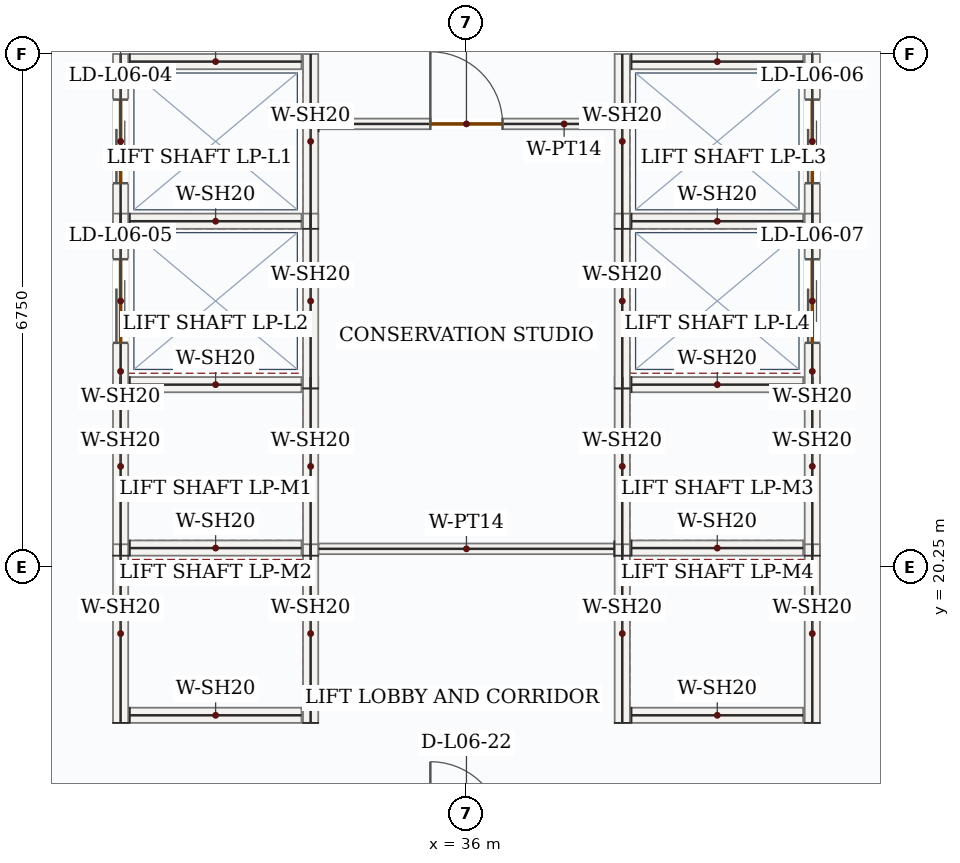
"""IFC4 building model, lengths in metres.
Left out: names, types, materials, properties, quantities, classifications, styles, units other than length and angle.
Written with IfcOpenShell. Run it as: python <this file> out.ifc"""

import sys

from ifc_helpers import new_model, si_unit, direction, frame, frame_2d, origin, place, context, subcontext, project, spatial, rectangle, extrude, source, transform, mapped, element, fill, save


model = new_model("IFC4")
c1 = context("Model", 3, precision=1e-05, world=origin(), true_north=direction((0.0, 1.0)))
c2 = subcontext(c1, "Body", "Model", "MODEL_VIEW")
j1 = project(units=[si_unit("LENGTHUNIT", "METRE"), si_unit("PLANEANGLEUNIT", "RADIAN")], contexts=[c1])
p1 = place(None, origin())
s1 = spatial("IfcSite", under=j1, at=p1, CompositionType="ELEMENT")
p2 = place(p1, origin())
s2 = spatial("IfcBuilding", under=s1, at=p2, CompositionType="ELEMENT")
p3 = place(p2, frame((0.0, 0.0, 33.3)))
s3 = spatial("IfcBuildingStorey", under=s2, at=p3, CompositionType="ELEMENT", Elevation=33.3)
m1 = source(origin(), c2, "Body", "SweptSolid", [
    extrude(rectangle(XDim=2.35, YDim=0.2, at=frame_2d((1.175, 0.0))), origin(), (0.0, 0.0, 1.0), 3.95),
])
for number, where, z_axis, x_axis in (
    (1, (31.45, 20.4, 0.0), (0.0, 0.0, 1.0), (0.0, 1.0, 0.0)),
    (2, (33.95, 20.4, 0.0), (0.0, 0.0, 1.0), (0.0, 1.0, 0.0)),
):
    element("IfcWall", number, at=place(p3, frame(where, z_axis=z_axis, x_axis=x_axis)), inside=s3, PredefinedType="SOLIDWALL", context=c2, shape_type="MappedRepresentation", body=[
        mapped(m1, transform((0.0, 0.0, 0.0), x_axis=(1.0, 0.0, 0.0), y_axis=(0.0, 1.0, 0.0), z_axis=(0.0, 0.0, 1.0), scale=1.0)),
    ])
m2 = source(origin(), c2, "Body", "SweptSolid", [
    extrude(rectangle(XDim=2.26, YDim=0.2, at=frame_2d((1.13, 0.0))), origin(), (0.0, 0.0, 1.0), 3.95),
])
for number, where, z_axis, x_axis in (
    (3, (31.57, 20.5, 0.0), (0.0, 0.0, 1.0), (1.0, 0.0, 0.0)),
    (4, (31.57, 22.65, 0.0), (0.0, 0.0, 1.0), (1.0, 0.0, 0.0)),
):
    element("IfcWall", number, at=place(p3, frame(where, z_axis=z_axis, x_axis=x_axis)), inside=s3, PredefinedType="SOLIDWALL", context=c2, shape_type="MappedRepresentation", body=[
        mapped(m2, transform((0.0, 0.0, 0.0), x_axis=(1.0, 0.0, 0.0), y_axis=(0.0, 1.0, 0.0), z_axis=(0.0, 0.0, 1.0), scale=1.0)),
    ])
for number, where, z_axis, x_axis in (
    (5, (31.45, 18.2, 0.0), (0.0, 0.0, 1.0), (0.0, 1.0, 0.0)),
    (6, (33.95, 18.2, 0.0), (0.0, 0.0, 1.0), (0.0, 1.0, 0.0)),
):
    element("IfcWall", number, at=place(p3, frame(where, z_axis=z_axis, x_axis=x_axis)), inside=s3, PredefinedType="SOLIDWALL", context=c2, shape_type="MappedRepresentation", body=[
        mapped(m1, transform((0.0, 0.0, 0.0), x_axis=(1.0, 0.0, 0.0), y_axis=(0.0, 1.0, 0.0), z_axis=(0.0, 0.0, 1.0), scale=1.0)),
    ])
p4 = place(p3, frame((31.57, 18.3, 0.0), z_axis=(0.0, 0.0, 1.0), x_axis=(1.0, 0.0, 0.0)))
e7 = element("IfcWall", 7, at=p4, inside=s3, PredefinedType="SOLIDWALL", context=c2, shape_type="MappedRepresentation", body=[
    mapped(m2, transform((0.0, 0.0, 0.0), x_axis=(1.0, 0.0, 0.0), y_axis=(0.0, 1.0, 0.0), z_axis=(0.0, 0.0, 1.0), scale=1.0)),
])
for number, where, z_axis, x_axis in (
    (8, (38.05, 20.4, 0.0), (0.0, 0.0, 1.0), (0.0, 1.0, 0.0)),
    (9, (40.55, 20.4, 0.0), (0.0, 0.0, 1.0), (0.0, 1.0, 0.0)),
):
    element("IfcWall", number, at=place(p3, frame(where, z_axis=z_axis, x_axis=x_axis)), inside=s3, PredefinedType="SOLIDWALL", context=c2, shape_type="MappedRepresentation", body=[
        mapped(m1, transform((0.0, 0.0, 0.0), x_axis=(1.0, 0.0, 0.0), y_axis=(0.0, 1.0, 0.0), z_axis=(0.0, 0.0, 1.0), scale=1.0)),
    ])
for number, where, z_axis, x_axis in (
    (10, (38.17, 20.5, 0.0), (0.0, 0.0, 1.0), (1.0, 0.0, 0.0)),
    (11, (38.17, 22.65, 0.0), (0.0, 0.0, 1.0), (1.0, 0.0, 0.0)),
):
    element("IfcWall", number, at=place(p3, frame(where, z_axis=z_axis, x_axis=x_axis)), inside=s3, PredefinedType="SOLIDWALL", context=c2, shape_type="MappedRepresentation", body=[
        mapped(m2, transform((0.0, 0.0, 0.0), x_axis=(1.0, 0.0, 0.0), y_axis=(0.0, 1.0, 0.0), z_axis=(0.0, 0.0, 1.0), scale=1.0)),
    ])
for number, where, z_axis, x_axis in (
    (12, (38.05, 18.2, 0.0), (0.0, 0.0, 1.0), (0.0, 1.0, 0.0)),
    (13, (40.55, 18.2, 0.0), (0.0, 0.0, 1.0), (0.0, 1.0, 0.0)),
):
    element("IfcWall", number, at=place(p3, frame(where, z_axis=z_axis, x_axis=x_axis)), inside=s3, PredefinedType="SOLIDWALL", context=c2, shape_type="MappedRepresentation", body=[
        mapped(m1, transform((0.0, 0.0, 0.0), x_axis=(1.0, 0.0, 0.0), y_axis=(0.0, 1.0, 0.0), z_axis=(0.0, 0.0, 1.0), scale=1.0)),
    ])
p5 = place(p3, frame((38.17, 18.3, 0.0), z_axis=(0.0, 0.0, 1.0), x_axis=(1.0, 0.0, 0.0)))
e14 = element("IfcWall", 14, at=p5, inside=s3, PredefinedType="SOLIDWALL", context=c2, shape_type="MappedRepresentation", body=[
    mapped(m2, transform((0.0, 0.0, 0.0), x_axis=(1.0, 0.0, 0.0), y_axis=(0.0, 1.0, 0.0), z_axis=(0.0, 0.0, 1.0), scale=1.0)),
])
p6 = place(p3, frame((31.45, 24.7, 0.0), z_axis=(0.0, 0.0, 1.0), x_axis=(0.0, 1.0, 0.0)))
e15 = element("IfcWall", 15, at=p6, inside=s3, PredefinedType="SOLIDWALL", context=c2, shape_type="SweptSolid", body=[
    extrude(rectangle(XDim=2.3, YDim=0.2, at=frame_2d((1.15, 0.0))), origin(), (0.0, 0.0, 1.0), 3.95),
])
p7 = place(p6, frame((0.6, 0.0, 0.0)))
e16 = element("IfcOpeningElement", 16, at=p7, cuts=e15, PredefinedType="OPENING", context=c2, shape_type="SweptSolid", body=[
    extrude(rectangle(XDim=1.1, YDim=2.15, at=frame_2d((0.55, 1.075))), frame((0.0, 0.11, 0.0), z_axis=(0.0, -1.0, 0.0), x_axis=(1.0, 0.0, 0.0)), (0.0, 0.0, 1.0), 0.22),
])
m3 = source(origin(), c2, "Body", "SweptSolid", [
    extrude(rectangle(XDim=2.3, YDim=0.2, at=frame_2d((1.15, 0.0))), origin(), (0.0, 0.0, 1.0), 3.95),
])
p8 = place(p3, frame((33.95, 24.7, 0.0), z_axis=(0.0, 0.0, 1.0), x_axis=(0.0, 1.0, 0.0)))
e17 = element("IfcWall", 17, at=p8, inside=s3, PredefinedType="SOLIDWALL", context=c2, shape_type="MappedRepresentation", body=[
    mapped(m3, transform((0.0, 0.0, 0.0), x_axis=(1.0, 0.0, 0.0), y_axis=(0.0, 1.0, 0.0), z_axis=(0.0, 0.0, 1.0), scale=1.0)),
])
for number, where, z_axis, x_axis in (
    (18, (31.57, 24.8, 0.0), (0.0, 0.0, 1.0), (1.0, 0.0, 0.0)),
    (19, (31.57, 26.9, 0.0), (0.0, 0.0, 1.0), (1.0, 0.0, 0.0)),
):
    element("IfcWall", number, at=place(p3, frame(where, z_axis=z_axis, x_axis=x_axis)), inside=s3, PredefinedType="SOLIDWALL", context=c2, shape_type="MappedRepresentation", body=[
        mapped(m2, transform((0.0, 0.0, 0.0), x_axis=(1.0, 0.0, 0.0), y_axis=(0.0, 1.0, 0.0), z_axis=(0.0, 0.0, 1.0), scale=1.0)),
    ])
p9 = place(p3, frame((31.45, 22.6, 0.0), z_axis=(0.0, 0.0, 1.0), x_axis=(0.0, 1.0, 0.0)))
e20 = element("IfcWall", 20, at=p9, inside=s3, PredefinedType="SOLIDWALL", context=c2, shape_type="SweptSolid", body=[
    extrude(rectangle(XDim=2.3, YDim=0.2, at=frame_2d((1.15, 0.0))), origin(), (0.0, 0.0, 1.0), 3.95),
])
p10 = place(p9, frame((0.6, 0.0, 0.0)))
e21 = element("IfcOpeningElement", 21, at=p10, cuts=e20, PredefinedType="OPENING", context=c2, shape_type="SweptSolid", body=[
    extrude(rectangle(XDim=1.1, YDim=2.15, at=frame_2d((0.55, 1.075))), frame((0.0, 0.11, 0.0), z_axis=(0.0, -1.0, 0.0), x_axis=(1.0, 0.0, 0.0)), (0.0, 0.0, 1.0), 0.22),
])
m4 = source(origin(), c2, "Body", "SweptSolid", [
    extrude(rectangle(XDim=2.3, YDim=0.2, at=frame_2d((1.15, 0.0))), origin(), (0.0, 0.0, 1.0), 3.95),
])
p11 = place(p3, frame((33.95, 22.6, 0.0), z_axis=(0.0, 0.0, 1.0), x_axis=(0.0, 1.0, 0.0)))
e22 = element("IfcWall", 22, at=p11, inside=s3, PredefinedType="SOLIDWALL", context=c2, shape_type="MappedRepresentation", body=[
    mapped(m4, transform((0.0, 0.0, 0.0), x_axis=(1.0, 0.0, 0.0), y_axis=(0.0, 1.0, 0.0), z_axis=(0.0, 0.0, 1.0), scale=1.0)),
])
p12 = place(p3, frame((38.05, 24.7, 0.0), z_axis=(0.0, 0.0, 1.0), x_axis=(0.0, 1.0, 0.0)))
e23 = element("IfcWall", 23, at=p12, inside=s3, PredefinedType="SOLIDWALL", context=c2, shape_type="MappedRepresentation", body=[
    mapped(m3, transform((0.0, 0.0, 0.0), x_axis=(1.0, 0.0, 0.0), y_axis=(0.0, 1.0, 0.0), z_axis=(0.0, 0.0, 1.0), scale=1.0)),
])
p13 = place(p3, frame((40.55, 24.7, 0.0), z_axis=(0.0, 0.0, 1.0), x_axis=(0.0, 1.0, 0.0)))
e24 = element("IfcWall", 24, at=p13, inside=s3, PredefinedType="SOLIDWALL", context=c2, shape_type="SweptSolid", body=[
    extrude(rectangle(XDim=2.3, YDim=0.2, at=frame_2d((1.15, 0.0))), origin(), (0.0, 0.0, 1.0), 3.95),
])
p14 = place(p13, frame((0.6, 0.0, 0.0)))
e25 = element("IfcOpeningElement", 25, at=p14, cuts=e24, PredefinedType="OPENING", context=c2, shape_type="SweptSolid", body=[
    extrude(rectangle(XDim=1.1, YDim=2.15, at=frame_2d((0.55, 1.075))), frame((0.0, 0.11, 0.0), z_axis=(0.0, -1.0, 0.0), x_axis=(1.0, 0.0, 0.0)), (0.0, 0.0, 1.0), 0.22),
])
for number, where, z_axis, x_axis in (
    (26, (38.17, 24.8, 0.0), (0.0, 0.0, 1.0), (1.0, 0.0, 0.0)),
    (27, (38.17, 26.9, 0.0), (0.0, 0.0, 1.0), (1.0, 0.0, 0.0)),
):
    element("IfcWall", number, at=place(p3, frame(where, z_axis=z_axis, x_axis=x_axis)), inside=s3, PredefinedType="SOLIDWALL", context=c2, shape_type="MappedRepresentation", body=[
        mapped(m2, transform((0.0, 0.0, 0.0), x_axis=(1.0, 0.0, 0.0), y_axis=(0.0, 1.0, 0.0), z_axis=(0.0, 0.0, 1.0), scale=1.0)),
    ])
p15 = place(p3, frame((38.05, 22.6, 0.0), z_axis=(0.0, 0.0, 1.0), x_axis=(0.0, 1.0, 0.0)))
e28 = element("IfcWall", 28, at=p15, inside=s3, PredefinedType="SOLIDWALL", context=c2, shape_type="MappedRepresentation", body=[
    mapped(m4, transform((0.0, 0.0, 0.0), x_axis=(1.0, 0.0, 0.0), y_axis=(0.0, 1.0, 0.0), z_axis=(0.0, 0.0, 1.0), scale=1.0)),
])
p16 = place(p3, frame((40.55, 22.6, 0.0), z_axis=(0.0, 0.0, 1.0), x_axis=(0.0, 1.0, 0.0)))
e29 = element("IfcWall", 29, at=p16, inside=s3, PredefinedType="SOLIDWALL", context=c2, shape_type="SweptSolid", body=[
    extrude(rectangle(XDim=2.3, YDim=0.2, at=frame_2d((1.15, 0.0))), origin(), (0.0, 0.0, 1.0), 3.95),
])
p17 = place(p16, frame((0.6, 0.0, 0.0)))
e30 = element("IfcOpeningElement", 30, at=p17, cuts=e29, PredefinedType="OPENING", context=c2, shape_type="SweptSolid", body=[
    extrude(rectangle(XDim=1.1, YDim=2.15, at=frame_2d((0.55, 1.075))), frame((0.0, 0.11, 0.0), z_axis=(0.0, -1.0, 0.0), x_axis=(1.0, 0.0, 0.0)), (0.0, 0.0, 1.0), 0.22),
])
p18 = place(p3, frame((34.055, 26.08, 0.0), z_axis=(0.0, 0.0, 1.0), x_axis=(1.0, 0.0, 0.0)))
e31 = element("IfcWall", 31, at=p18, inside=s3, PredefinedType="PARTITIONING", context=c2, shape_type="SweptSolid", body=[
    extrude(rectangle(XDim=3.89, YDim=0.14, at=frame_2d((1.945, 0.0))), origin(), (0.0, 0.0, 1.0), 3.95),
])
p19 = place(p18, frame((1.47, 0.0, 0.0)))
e32 = element("IfcOpeningElement", 32, at=p19, cuts=e31, PredefinedType="OPENING", context=c2, shape_type="SweptSolid", body=[
    extrude(rectangle(XDim=0.95, YDim=2.15, at=frame_2d((0.475, 1.075))), frame((0.0, 0.08, 0.0), z_axis=(0.0, -1.0, 0.0), x_axis=(1.0, 0.0, 0.0)), (0.0, 0.0, 1.0), 0.16),
])
m5 = source(origin(), c2, "Body", "SweptSolid", [
    extrude(rectangle(XDim=3.89, YDim=0.14, at=frame_2d((1.945, 0.0))), origin(), (0.0, 0.0, 1.0), 3.95),
])
p20 = place(p3, frame((37.945, 20.49, 0.0), z_axis=(0.0, 0.0, 1.0), x_axis=(-1.0, 0.0, 0.0)))
e33 = element("IfcWall", 33, at=p20, inside=s3, PredefinedType="PARTITIONING", context=c2, shape_type="MappedRepresentation", body=[
    mapped(m5, transform((0.0, 0.0, 0.0), x_axis=(1.0, 0.0, 0.0), y_axis=(0.0, 1.0, 0.0), z_axis=(0.0, 0.0, 1.0), scale=1.0)),
])
m6 = source(origin(), c2, "Body", "SweptSolid", [
    extrude(rectangle(XDim=1.1, YDim=2.15, at=frame_2d((0.55, 1.075))), frame((0.0, 0.025, 0.0), z_axis=(0.0, -1.0, 0.0), x_axis=(1.0, 0.0, 0.0)), (0.0, 0.0, 1.0), 0.05),
])
p21 = place(p7, origin())
e34 = element("IfcDoor", 34, at=p21, inside=s3, OperationType="DOUBLE_DOOR_SLIDING", PredefinedType="DOOR", context=c2, shape_type="MappedRepresentation", body=[
    mapped(m6, transform((0.0, 0.0, 0.0), x_axis=(1.0, 0.0, 0.0), y_axis=(0.0, 1.0, 0.0), z_axis=(0.0, 0.0, 1.0), scale=1.0)),
])
fill(e16, e34)
p22 = place(p10, origin())
e35 = element("IfcDoor", 35, at=p22, inside=s3, OperationType="DOUBLE_DOOR_SLIDING", PredefinedType="DOOR", context=c2, shape_type="MappedRepresentation", body=[
    mapped(m6, transform((0.0, 0.0, 0.0), x_axis=(1.0, 0.0, 0.0), y_axis=(0.0, 1.0, 0.0), z_axis=(0.0, 0.0, 1.0), scale=1.0)),
])
fill(e21, e35)
p23 = place(p14, origin())
e36 = element("IfcDoor", 36, at=p23, inside=s3, OperationType="DOUBLE_DOOR_SLIDING", PredefinedType="DOOR", context=c2, shape_type="MappedRepresentation", body=[
    mapped(m6, transform((0.0, 0.0, 0.0), x_axis=(1.0, 0.0, 0.0), y_axis=(0.0, 1.0, 0.0), z_axis=(0.0, 0.0, 1.0), scale=1.0)),
])
fill(e25, e36)
p24 = place(p17, origin())
e37 = element("IfcDoor", 37, at=p24, inside=s3, OperationType="DOUBLE_DOOR_SLIDING", PredefinedType="DOOR", context=c2, shape_type="MappedRepresentation", body=[
    mapped(m6, transform((0.0, 0.0, 0.0), x_axis=(1.0, 0.0, 0.0), y_axis=(0.0, 1.0, 0.0), z_axis=(0.0, 0.0, 1.0), scale=1.0)),
])
fill(e30, e37)
m7 = source(origin(), c2, "Body", "SweptSolid", [
    extrude(rectangle(XDim=0.95, YDim=2.15, at=frame_2d((0.475, 1.075))), frame((0.0, 0.025, 0.0), z_axis=(0.0, -1.0, 0.0), x_axis=(1.0, 0.0, 0.0)), (0.0, 0.0, 1.0), 0.05),
])
p25 = place(p19, origin())
e38 = element("IfcDoor", 38, at=p25, inside=s3, OperationType="SINGLE_SWING_LEFT", PredefinedType="DOOR", context=c2, shape_type="MappedRepresentation", body=[
    mapped(m7, transform((0.0, 0.0, 0.0), x_axis=(1.0, 0.0, 0.0), y_axis=(0.0, 1.0, 0.0), z_axis=(0.0, 0.0, 1.0), scale=1.0)),
])
fill(e32, e38)
save(model, sys.argv[1])
